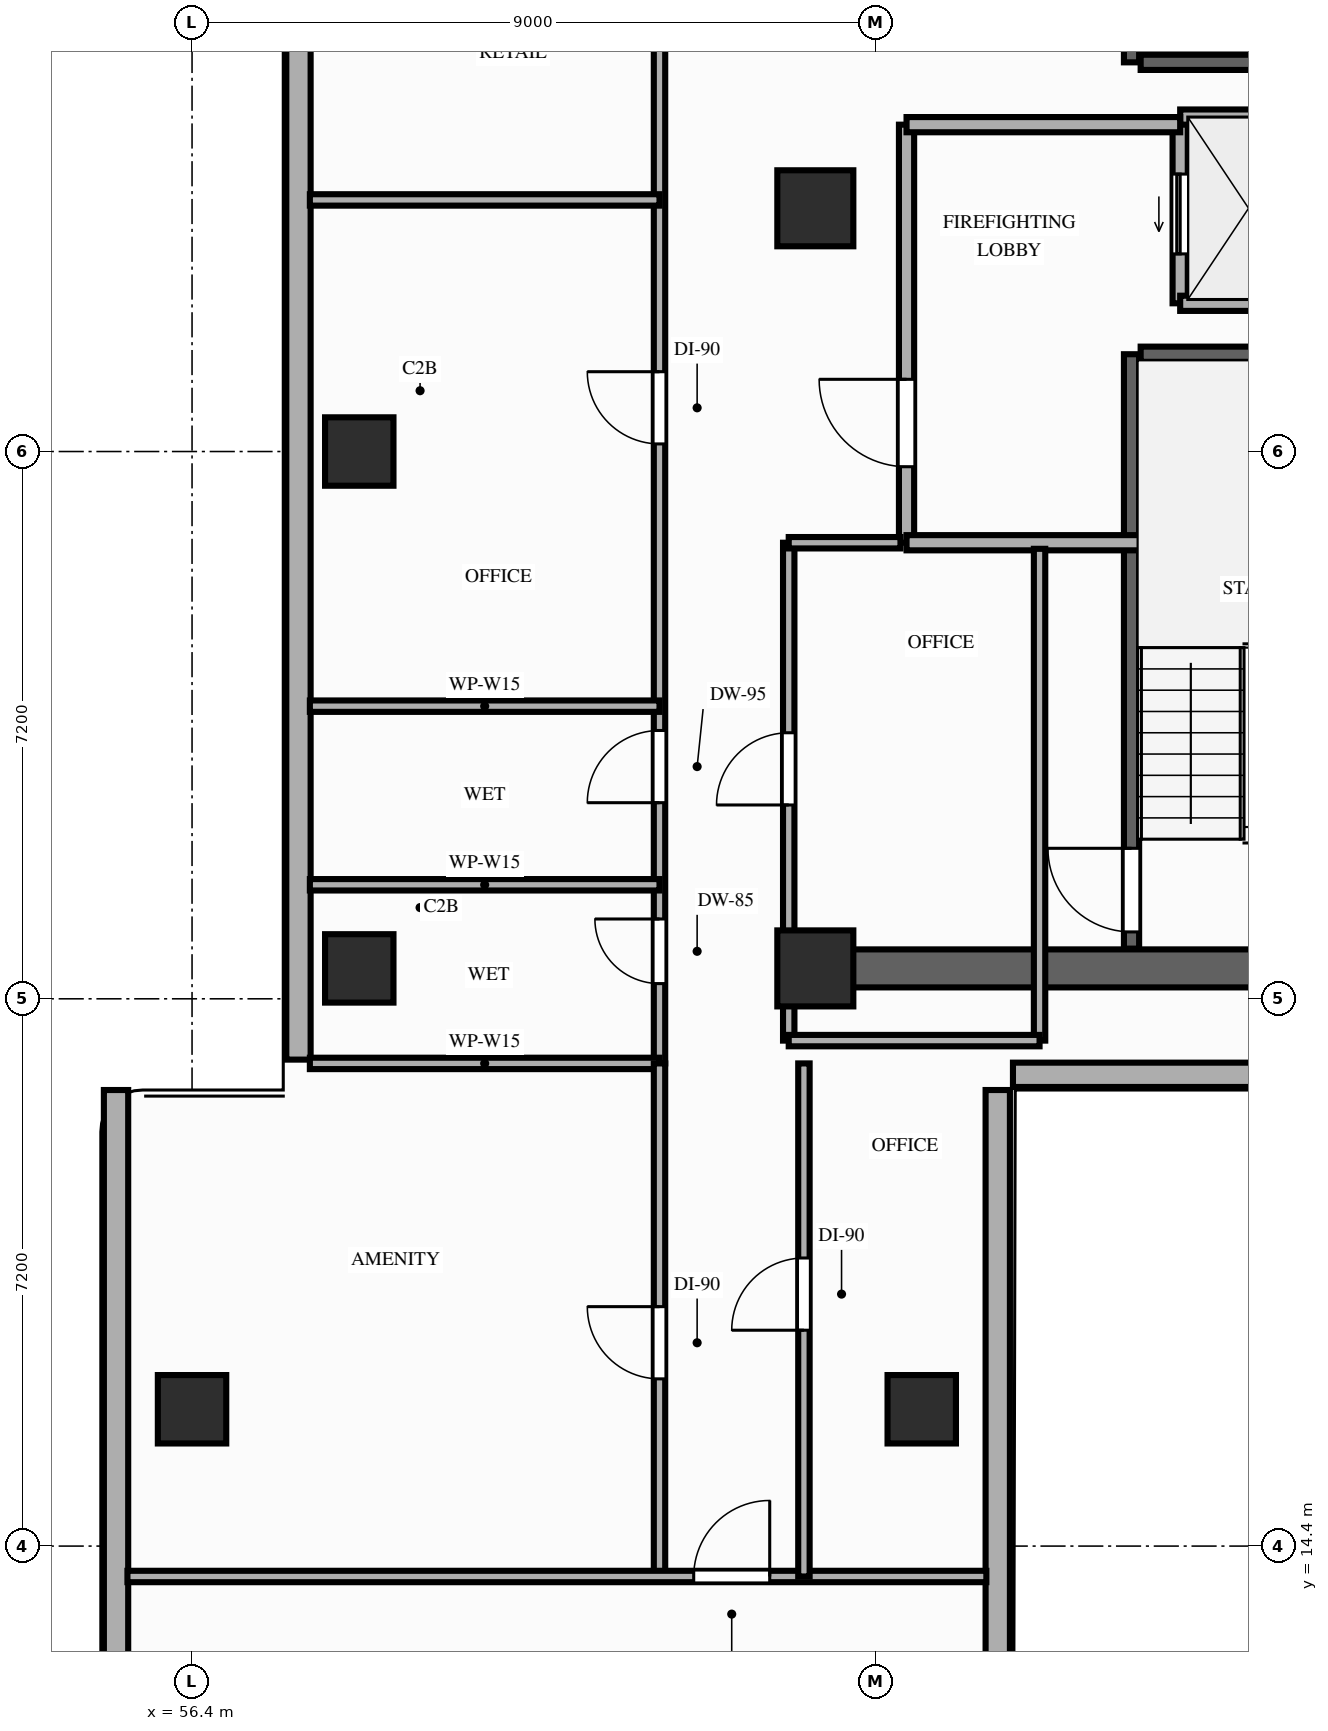
"""IFC4 building model, lengths in metres.
Left out: names, types, materials, properties, quantities, classifications, styles, units other than length and angle.
Written with IfcOpenShell. Run it as: python <this file> out.ifc"""

import sys

from ifc_helpers import new_model, si_unit, direction, frame, frame_2d, origin, origin_2d, place, context, subcontext, project, spatial, rectangle, extrude, element, fill, save


model = new_model("IFC4")
c1 = context("Model", 3, precision=1e-05, world=origin(), true_north=direction((0.0, 1.0)))
c2 = subcontext(c1, "Body", "Model", "MODEL_VIEW")
j1 = project(units=[si_unit("LENGTHUNIT", "METRE"), si_unit("PLANEANGLEUNIT", "RADIAN")], contexts=[c1])
p1 = place(None, origin())
s1 = spatial("IfcSite", under=j1, at=p1, CompositionType="ELEMENT")
p2 = place(p1, origin())
s2 = spatial("IfcBuilding", under=s1, at=p2, CompositionType="ELEMENT")
p3 = place(p2, frame((0.0, 0.0, 66.0)))
s3 = spatial("IfcBuildingStorey", under=s2, at=p3, CompositionType="ELEMENT", Elevation=66.0)
for number, where, z_axis, x_axis in (
    (1, (64.6, 22.0, 0.0), (0.0, 0.0, 1.0), (1.0, 0.0, 0.0)),
    (2, (64.6, 32.0, 0.0), (0.0, 0.0, 1.0), (1.0, 0.0, 0.0)),
):
    element("IfcColumn", number, at=place(p3, frame(where, z_axis=z_axis, x_axis=x_axis)), inside=s3, PredefinedType="COLUMN", context=c2, shape_type="SweptSolid", body=[
        extrude(rectangle(XDim=1.0, YDim=1.0, at=origin_2d()), origin(), (0.0, 0.0, 1.0), 3.2),
    ])
for number, where, z_axis, x_axis in (
    (3, (58.6, 22.0, 0.0), (0.0, 0.0, 1.0), (1.0, 0.0, 0.0)),
    (4, (58.6, 28.8, 0.0), (0.0, 0.0, 1.0), (1.0, 0.0, 0.0)),
    (5, (56.4, 16.2, 0.0), (0.0, 0.0, 1.0), (1.0, 0.0, 0.0)),
    (6, (66.0, 16.2, 0.0), (0.0, 0.0, 1.0), (1.0, 0.0, 0.0)),
):
    element("IfcColumn", number, at=place(p3, frame(where, z_axis=z_axis, x_axis=x_axis)), inside=s3, PredefinedType="COLUMN", context=c2, shape_type="SweptSolid", body=[
        extrude(rectangle(XDim=0.9, YDim=0.9, at=origin_2d()), origin(), (0.0, 0.0, 1.0), 3.2),
    ])
p4 = place(p3, frame((57.8, 43.4, 0.0), z_axis=(0.0, 0.0, 1.0), x_axis=(0.0, -1.0, 0.0)))
e7 = element("IfcWall", 7, at=p4, inside=s3, PredefinedType="STANDARD", context=c2, shape_type="SweptSolid", body=[
    extrude(rectangle(XDim=22.6, YDim=0.32, at=frame_2d((11.3, 0.0))), origin(), (0.0, 0.0, 1.0), 2.6),
])
p5 = place(p4, frame((3.7, 0.0, 0.0)))
e8 = element("IfcOpeningElement", 8, at=p5, cuts=e7, PredefinedType="OPENING", context=c2, shape_type="SweptSolid", body=[
    extrude(rectangle(XDim=1.4, YDim=2.1, at=frame_2d((0.7, 1.05))), frame((0.0, 0.17, 0.0), z_axis=(0.0, -1.0, 0.0), x_axis=(1.0, 0.0, 0.0)), (0.0, 0.0, 1.0), 0.34),
])
for number, where, z_axis, x_axis in (
    (9, (55.4, 20.4, 0.0), (0.0, 0.0, 1.0), (0.0, -1.0, 0.0)),
    (10, (67.0, 7.6, 0.0), (0.0, 0.0, 1.0), (0.0, 1.0, 0.0)),
):
    element("IfcWall", number, at=place(p3, frame(where, z_axis=z_axis, x_axis=x_axis)), inside=s3, PredefinedType="STANDARD", context=c2, shape_type="SweptSolid", body=[
        extrude(rectangle(XDim=12.8, YDim=0.32, at=frame_2d((6.4, 0.0))), origin(), (0.0, 0.0, 1.0), 3.02),
    ])
p6 = place(p3, frame((67.2, 20.6, 0.0), z_axis=(0.0, 0.0, 1.0), x_axis=(1.0, 0.0, 0.0)))
e11 = element("IfcWall", 11, at=p6, inside=s3, PredefinedType="STANDARD", context=c2, shape_type="SweptSolid", body=[
    extrude(rectangle(XDim=5.6, YDim=0.32, at=frame_2d((2.8, 0.0))), origin(), (0.0, 0.0, 1.0), 3.02),
])
p7 = place(p3, frame((64.6, 22.0, 0.0), z_axis=(0.0, 0.0, 1.0), x_axis=(1.0, 0.0, 0.0)))
e12 = element("IfcWall", 12, at=p7, inside=s3, PredefinedType="SHEAR", context=c2, shape_type="SweptSolid", body=[
    extrude(rectangle(XDim=7.5, YDim=0.5, at=frame_2d((3.75, 0.0))), origin(), (0.0, 0.0, 1.0), 3.02),
])
p8 = place(p3, frame((68.76, 22.26, 0.0), z_axis=(0.0, 0.0, 1.0), x_axis=(0.0, 1.0, 0.0)))
e13 = element("IfcWall", 13, at=p8, inside=s3, PredefinedType="SHEAR", context=c2, shape_type="SweptSolid", body=[
    extrude(rectangle(XDim=7.82, YDim=0.2, at=frame_2d((3.91, 0.0))), origin(), (0.0, 0.0, 1.0), 3.02),
])
p9 = place(p8, frame((0.22, 0.0, 0.0)))
e14 = element("IfcOpeningElement", 14, at=p9, cuts=e13, PredefinedType="OPENING", context=c2, shape_type="SweptSolid", body=[
    extrude(rectangle(XDim=1.1, YDim=2.15, at=frame_2d((0.55, 1.075))), frame((0.0, 0.11, 0.0), z_axis=(0.0, -1.0, 0.0), x_axis=(1.0, 0.0, 0.0)), (0.0, 0.0, 1.0), 0.22),
])
p10 = place(p3, frame((68.88, 30.08, 0.0), z_axis=(0.0, 0.0, 1.0), x_axis=(1.0, 0.0, 0.0)))
e15 = element("IfcWall", 15, at=p10, inside=s3, PredefinedType="SHEAR", context=c2, shape_type="SweptSolid", body=[
    extrude(rectangle(XDim=2.88, YDim=0.2, at=frame_2d((1.44, 0.0))), origin(), (0.0, 0.0, 1.0), 3.02),
])
p11 = place(p3, frame((68.76, 33.92, 0.0), z_axis=(0.0, 0.0, 1.0), x_axis=(0.0, 1.0, 0.0)))
e16 = element("IfcWall", 16, at=p11, inside=s3, PredefinedType="SHEAR", context=c2, shape_type="SweptSolid", body=[
    extrude(rectangle(XDim=7.96, YDim=0.2, at=frame_2d((3.98, 0.0))), origin(), (0.0, 0.0, 1.0), 3.02),
])
p12 = place(p11, frame((0.22, 0.0, 0.0)))
e17 = element("IfcOpeningElement", 17, at=p12, cuts=e16, PredefinedType="OPENING", context=c2, shape_type="SweptSolid", body=[
    extrude(rectangle(XDim=1.1, YDim=2.15, at=frame_2d((0.55, 1.075))), frame((0.0, 0.11, 0.0), z_axis=(0.0, -1.0, 0.0), x_axis=(1.0, 0.0, 0.0)), (0.0, 0.0, 1.0), 0.22),
])
p13 = place(p3, frame((68.88, 33.92, 0.0), z_axis=(0.0, 0.0, 1.0), x_axis=(1.0, 0.0, 0.0)))
e18 = element("IfcWall", 18, at=p13, inside=s3, PredefinedType="SHEAR", context=c2, shape_type="SweptSolid", body=[
    extrude(rectangle(XDim=2.88, YDim=0.2, at=frame_2d((1.44, 0.0))), origin(), (0.0, 0.0, 1.0), 3.02),
])
p14 = place(p3, frame((69.4, 30.75, 0.0), z_axis=(0.0, 0.0, 1.0), x_axis=(0.0, 1.0, 0.0)))
e19 = element("IfcWall", 19, at=p14, inside=s3, PredefinedType="MOVABLE", context=c2, shape_type="SweptSolid", body=[
    extrude(rectangle(XDim=2.45, YDim=0.2, at=frame_2d((1.225, 0.0))), origin(), (0.0, 0.0, 1.0), 3.02),
])
p15 = place(p14, frame((0.65, 0.0, 0.0)))
e20 = element("IfcOpeningElement", 20, at=p15, cuts=e19, PredefinedType="OPENING", context=c2, shape_type="SweptSolid", body=[
    extrude(rectangle(XDim=1.05, YDim=2.15, at=frame_2d((0.525, 1.075))), frame((0.0, 0.11, 0.0), z_axis=(0.0, -1.0, 0.0), x_axis=(1.0, 0.0, 0.0)), (0.0, 0.0, 1.0), 0.22),
])
for number, where, z_axis, x_axis in (
    (21, (69.4, 33.2, 0.0), (0.0, 0.0, 1.0), (1.0, 0.0, 0.0)),
    (22, (69.4, 30.75, 0.0), (0.0, 0.0, 1.0), (1.0, 0.0, 0.0)),
):
    element("IfcWall", number, at=place(p3, frame(where, z_axis=z_axis, x_axis=x_axis)), inside=s3, PredefinedType="MOVABLE", context=c2, shape_type="SweptSolid", body=[
        extrude(rectangle(XDim=1.75, YDim=0.2, at=frame_2d((0.875, 0.0))), origin(), (0.0, 0.0, 1.0), 3.02),
    ])
p16 = place(p3, frame((65.8, 27.6, 0.0), z_axis=(0.0, 0.0, 1.0), x_axis=(0.0, 1.0, 0.0)))
e23 = element("IfcWall", 23, at=p16, inside=s3, PredefinedType="PARTITIONING", context=c2, shape_type="SweptSolid", body=[
    extrude(rectangle(XDim=5.5, YDim=0.2, at=frame_2d((2.75, 0.0))), origin(), (0.0, 0.0, 1.0), 3.02),
])
p17 = place(p16, frame((1.0, 0.0, 0.0)))
e24 = element("IfcOpeningElement", 24, at=p17, cuts=e23, PredefinedType="OPENING", context=c2, shape_type="SweptSolid", body=[
    extrude(rectangle(XDim=1.15, YDim=2.15, at=frame_2d((0.575, 1.075))), frame((0.0, 0.11, 0.0), z_axis=(0.0, -1.0, 0.0), x_axis=(1.0, 0.0, 0.0)), (0.0, 0.0, 1.0), 0.22),
])
p18 = place(p3, frame((65.8, 33.1, 0.0), z_axis=(0.0, 0.0, 1.0), x_axis=(1.0, 0.0, 0.0)))
e25 = element("IfcWall", 25, at=p18, inside=s3, PredefinedType="PARTITIONING", context=c2, shape_type="SweptSolid", body=[
    extrude(rectangle(XDim=3.6, YDim=0.2, at=frame_2d((1.8, 0.0))), origin(), (0.0, 0.0, 1.0), 3.02),
])
p19 = place(p3, frame((65.8, 27.6, 0.0), z_axis=(0.0, 0.0, 1.0), x_axis=(1.0, 0.0, 0.0)))
e26 = element("IfcWall", 26, at=p19, inside=s3, PredefinedType="PARTITIONING", context=c2, shape_type="SweptSolid", body=[
    extrude(rectangle(XDim=3.4, YDim=0.2, at=frame_2d((1.7, 0.0))), origin(), (0.0, 0.0, 1.0), 3.02),
])
p20 = place(p3, frame((64.25, 21.05, 0.0), z_axis=(0.0, 0.0, 1.0), x_axis=(0.0, 1.0, 0.0)))
e27 = element("IfcWall", 27, at=p20, inside=s3, PredefinedType="PARTITIONING", context=c2, shape_type="SweptSolid", body=[
    extrude(rectangle(XDim=6.55, YDim=0.15, at=frame_2d((3.275, 0.0))), origin(), (0.0, 0.0, 1.0), 2.6),
])
p21 = place(p20, frame((3.1, 0.0, 0.0)))
e28 = element("IfcOpeningElement", 28, at=p21, cuts=e27, PredefinedType="OPENING", context=c2, shape_type="SweptSolid", body=[
    extrude(rectangle(XDim=0.95, YDim=2.15, at=frame_2d((0.475, 1.075))), frame((0.0, 0.085, 0.0), z_axis=(0.0, -1.0, 0.0), x_axis=(1.0, 0.0, 0.0)), (0.0, 0.0, 1.0), 0.17),
])
p22 = place(p3, frame((67.55, 21.05, 0.0), z_axis=(0.0, 0.0, 1.0), x_axis=(0.0, 1.0, 0.0)))
e29 = element("IfcWall", 29, at=p22, inside=s3, PredefinedType="PARTITIONING", context=c2, shape_type="SweptSolid", body=[
    extrude(rectangle(XDim=6.47, YDim=0.15, at=frame_2d((3.235, 0.0))), origin(), (0.0, 0.0, 1.0), 2.6),
])
p23 = place(p3, frame((64.25, 21.05, 0.0), z_axis=(0.0, 0.0, 1.0), x_axis=(1.0, 0.0, 0.0)))
e30 = element("IfcWall", 30, at=p23, inside=s3, PredefinedType="PARTITIONING", context=c2, shape_type="SweptSolid", body=[
    extrude(rectangle(XDim=3.3, YDim=0.15, at=frame_2d((1.65, 0.0))), origin(), (0.0, 0.0, 1.0), 2.6),
])
p24 = place(p3, frame((64.25, 27.6, 0.0), z_axis=(0.0, 0.0, 1.0), x_axis=(1.0, 0.0, 0.0)))
e31 = element("IfcWall", 31, at=p24, inside=s3, PredefinedType="PARTITIONING", context=c2, shape_type="SweptSolid", body=[
    extrude(rectangle(XDim=1.47, YDim=0.15, at=frame_2d((0.735, 0.0))), origin(), (0.0, 0.0, 1.0), 2.6),
])
p25 = place(p3, frame((62.55, 20.75, 0.0), z_axis=(0.0, 0.0, 1.0), x_axis=(0.0, 1.0, 0.0)))
e32 = element("IfcWall", 32, at=p25, inside=s3, PredefinedType="PARTITIONING", context=c2, shape_type="SweptSolid", body=[
    extrude(rectangle(XDim=22.7, YDim=0.15, at=frame_2d((11.35, 0.0))), origin(), (0.0, 0.0, 1.0), 2.6),
])
p26 = place(p25, frame((1.05, 0.0, 0.0)))
e33 = element("IfcOpeningElement", 33, at=p26, cuts=e32, PredefinedType="OPENING", context=c2, shape_type="SweptSolid", body=[
    extrude(rectangle(XDim=0.85, YDim=2.1, at=frame_2d((0.425, 1.05))), frame((0.0, 0.085, 0.0), z_axis=(0.0, -1.0, 0.0), x_axis=(1.0, 0.0, 0.0)), (0.0, 0.0, 1.0), 0.17),
])
p27 = place(p25, frame((3.43, 0.0, 0.0)))
e34 = element("IfcOpeningElement", 34, at=p27, cuts=e32, PredefinedType="OPENING", context=c2, shape_type="SweptSolid", body=[
    extrude(rectangle(XDim=0.95, YDim=2.1, at=frame_2d((0.475, 1.05))), frame((0.0, 0.085, 0.0), z_axis=(0.0, -1.0, 0.0), x_axis=(1.0, 0.0, 0.0)), (0.0, 0.0, 1.0), 0.17),
])
p28 = place(p25, frame((8.15, 0.0, 0.0)))
e35 = element("IfcOpeningElement", 35, at=p28, cuts=e32, PredefinedType="OPENING", context=c2, shape_type="SweptSolid", body=[
    extrude(rectangle(XDim=0.95, YDim=2.15, at=frame_2d((0.475, 1.075))), frame((0.0, 0.085, 0.0), z_axis=(0.0, -1.0, 0.0), x_axis=(1.0, 0.0, 0.0)), (0.0, 0.0, 1.0), 0.17),
])
p29 = place(p25, frame((16.55, 0.0, 0.0)))
e36 = element("IfcOpeningElement", 36, at=p29, cuts=e32, PredefinedType="OPENING", context=c2, shape_type="SweptSolid", body=[
    extrude(rectangle(XDim=0.95, YDim=2.15, at=frame_2d((0.475, 1.075))), frame((0.0, 0.085, 0.0), z_axis=(0.0, -1.0, 0.0), x_axis=(1.0, 0.0, 0.0)), (0.0, 0.0, 1.0), 0.17),
])
for number, where, z_axis, x_axis in (
    (37, (57.95, 20.75, 0.0), (0.0, 0.0, 1.0), (1.0, 0.0, 0.0)),
    (38, (57.95, 23.1, 0.0), (0.0, 0.0, 1.0), (1.0, 0.0, 0.0)),
    (39, (57.95, 25.45, 0.0), (0.0, 0.0, 1.0), (1.0, 0.0, 0.0)),
    (40, (57.95, 32.11, 0.0), (0.0, 0.0, 1.0), (1.0, 0.0, 0.0)),
):
    element("IfcWall", number, at=place(p3, frame(where, z_axis=z_axis, x_axis=x_axis)), inside=s3, PredefinedType="PARTITIONING", context=c2, shape_type="SweptSolid", body=[
        extrude(rectangle(XDim=4.6, YDim=0.15, at=frame_2d((2.3, 0.0))), origin(), (0.0, 0.0, 1.0), 2.6),
    ])
p30 = place(p3, frame((62.55, 14.0, 0.0), z_axis=(0.0, 0.0, 1.0), x_axis=(0.0, 1.0, 0.0)))
e41 = element("IfcWall", 41, at=p30, inside=s3, PredefinedType="PARTITIONING", context=c2, shape_type="SweptSolid", body=[
    extrude(rectangle(XDim=6.75, YDim=0.15, at=frame_2d((3.375, 0.0))), origin(), (0.0, 0.0, 1.0), 2.6),
])
p31 = place(p30, frame((2.6, 0.0, 0.0)))
e42 = element("IfcOpeningElement", 42, at=p31, cuts=e41, PredefinedType="OPENING", context=c2, shape_type="SweptSolid", body=[
    extrude(rectangle(XDim=0.95, YDim=2.15, at=frame_2d((0.475, 1.075))), frame((0.0, 0.085, 0.0), z_axis=(0.0, -1.0, 0.0), x_axis=(1.0, 0.0, 0.0)), (0.0, 0.0, 1.0), 0.17),
])
p32 = place(p3, frame((55.55, 14.0, 0.0), z_axis=(0.0, 0.0, 1.0), x_axis=(1.0, 0.0, 0.0)))
e43 = element("IfcWall", 43, at=p32, inside=s3, PredefinedType="PARTITIONING", context=c2, shape_type="SweptSolid", body=[
    extrude(rectangle(XDim=11.3, YDim=0.15, at=frame_2d((5.65, 0.0))), origin(), (0.0, 0.0, 1.0), 2.6),
])
p33 = place(p32, frame((7.45, 0.0, 0.0)))
e44 = element("IfcOpeningElement", 44, at=p33, cuts=e43, PredefinedType="OPENING", context=c2, shape_type="SweptSolid", body=[
    extrude(rectangle(XDim=1.0, YDim=2.15, at=frame_2d((0.5, 1.075))), frame((0.0, 0.085, 0.0), z_axis=(0.0, -1.0, 0.0), x_axis=(1.0, 0.0, 0.0)), (0.0, 0.0, 1.0), 0.17),
])
p34 = place(p3, frame((64.45, 14.0, 0.0), z_axis=(0.0, 0.0, 1.0), x_axis=(0.0, 1.0, 0.0)))
e45 = element("IfcWall", 45, at=p34, inside=s3, PredefinedType="PARTITIONING", context=c2, shape_type="SweptSolid", body=[
    extrude(rectangle(XDim=6.75, YDim=0.15, at=frame_2d((3.375, 0.0))), origin(), (0.0, 0.0, 1.0), 2.6),
])
p35 = place(p34, frame((3.24, 0.0, 0.0)))
e46 = element("IfcOpeningElement", 46, at=p35, cuts=e45, PredefinedType="OPENING", context=c2, shape_type="SweptSolid", body=[
    extrude(rectangle(XDim=0.95, YDim=2.15, at=frame_2d((0.475, 1.075))), frame((0.0, 0.085, 0.0), z_axis=(0.0, -1.0, 0.0), x_axis=(1.0, 0.0, 0.0)), (0.0, 0.0, 1.0), 0.17),
])
p36 = place(p9, origin())
e47 = element("IfcDoor", 47, at=p36, inside=s3, OperationType="SINGLE_SWING_RIGHT", PredefinedType="DOOR", context=c2, shape_type="SweptSolid", body=[
    extrude(rectangle(XDim=1.1, YDim=2.15, at=frame_2d((0.55, 1.075))), frame((0.0, 0.025, 0.0), z_axis=(0.0, -1.0, 0.0), x_axis=(1.0, 0.0, 0.0)), (0.0, 0.0, 1.0), 0.05),
])
fill(e14, e47)
p37 = place(p15, origin())
e48 = element("IfcDoor", 48, at=p37, inside=s3, OperationType="SLIDING_TO_LEFT", PredefinedType="DOOR", context=c2, shape_type="SweptSolid", body=[
    extrude(rectangle(XDim=1.05, YDim=2.15, at=frame_2d((0.525, 1.075))), frame((0.0, 0.025, 0.0), z_axis=(0.0, -1.0, 0.0), x_axis=(1.0, 0.0, 0.0)), (0.0, 0.0, 1.0), 0.05),
])
fill(e20, e48)
p38 = place(p17, origin())
e49 = element("IfcDoor", 49, at=p38, inside=s3, OperationType="SINGLE_SWING_RIGHT", PredefinedType="DOOR", context=c2, shape_type="SweptSolid", body=[
    extrude(rectangle(XDim=1.15, YDim=2.15, at=frame_2d((0.575, 1.075))), frame((0.0, 0.025, 0.0), z_axis=(0.0, -1.0, 0.0), x_axis=(1.0, 0.0, 0.0)), (0.0, 0.0, 1.0), 0.05),
])
fill(e24, e49)
p39 = place(p21, origin())
e50 = element("IfcDoor", 50, at=p39, inside=s3, OperationType="SINGLE_SWING_LEFT", PredefinedType="DOOR", context=c2, shape_type="SweptSolid", body=[
    extrude(rectangle(XDim=0.95, YDim=2.15, at=frame_2d((0.475, 1.075))), frame((0.0, 0.025, 0.0), z_axis=(0.0, -1.0, 0.0), x_axis=(1.0, 0.0, 0.0)), (0.0, 0.0, 1.0), 0.05),
])
fill(e28, e50)
p40 = place(p26, origin())
e51 = element("IfcDoor", 51, at=p40, inside=s3, OperationType="SINGLE_SWING_RIGHT", PredefinedType="DOOR", context=c2, shape_type="SweptSolid", body=[
    extrude(rectangle(XDim=0.85, YDim=2.1, at=frame_2d((0.425, 1.05))), frame((0.0, 0.025, 0.0), z_axis=(0.0, -1.0, 0.0), x_axis=(1.0, 0.0, 0.0)), (0.0, 0.0, 1.0), 0.05),
])
fill(e33, e51)
p41 = place(p27, origin())
e52 = element("IfcDoor", 52, at=p41, inside=s3, OperationType="SINGLE_SWING_LEFT", PredefinedType="DOOR", context=c2, shape_type="SweptSolid", body=[
    extrude(rectangle(XDim=0.95, YDim=2.1, at=frame_2d((0.475, 1.05))), frame((0.0, 0.025, 0.0), z_axis=(0.0, -1.0, 0.0), x_axis=(1.0, 0.0, 0.0)), (0.0, 0.0, 1.0), 0.05),
])
fill(e34, e52)
p42 = place(p28, origin())
e53 = element("IfcDoor", 53, at=p42, inside=s3, OperationType="SINGLE_SWING_RIGHT", PredefinedType="DOOR", context=c2, shape_type="SweptSolid", body=[
    extrude(rectangle(XDim=0.95, YDim=2.15, at=frame_2d((0.475, 1.075))), frame((0.0, 0.025, 0.0), z_axis=(0.0, -1.0, 0.0), x_axis=(1.0, 0.0, 0.0)), (0.0, 0.0, 1.0), 0.05),
])
fill(e35, e53)
p43 = place(p31, origin())
e54 = element("IfcDoor", 54, at=p43, inside=s3, OperationType="SINGLE_SWING_RIGHT", PredefinedType="DOOR", context=c2, shape_type="SweptSolid", body=[
    extrude(rectangle(XDim=0.95, YDim=2.15, at=frame_2d((0.475, 1.075))), frame((0.0, 0.025, 0.0), z_axis=(0.0, -1.0, 0.0), x_axis=(1.0, 0.0, 0.0)), (0.0, 0.0, 1.0), 0.05),
])
fill(e42, e54)
p44 = place(p35, origin())
e55 = element("IfcDoor", 55, at=p44, inside=s3, OperationType="SINGLE_SWING_LEFT", PredefinedType="DOOR", context=c2, shape_type="SweptSolid", body=[
    extrude(rectangle(XDim=0.95, YDim=2.15, at=frame_2d((0.475, 1.075))), frame((0.0, 0.025, 0.0), z_axis=(0.0, -1.0, 0.0), x_axis=(1.0, 0.0, 0.0)), (0.0, 0.0, 1.0), 0.05),
])
fill(e46, e55)
p45 = place(p33, origin())
e56 = element("IfcDoor", 56, at=p45, inside=s3, OperationType="SINGLE_SWING_RIGHT", PredefinedType="DOOR", context=c2, shape_type="SweptSolid", body=[
    extrude(rectangle(XDim=1.0, YDim=2.15, at=frame_2d((0.5, 1.075))), frame((0.0, 0.025, 0.0), z_axis=(0.0, -1.0, 0.0), x_axis=(1.0, 0.0, 0.0)), (0.0, 0.0, 1.0), 0.05),
])
fill(e44, e56)
save(model, sys.argv[1])
